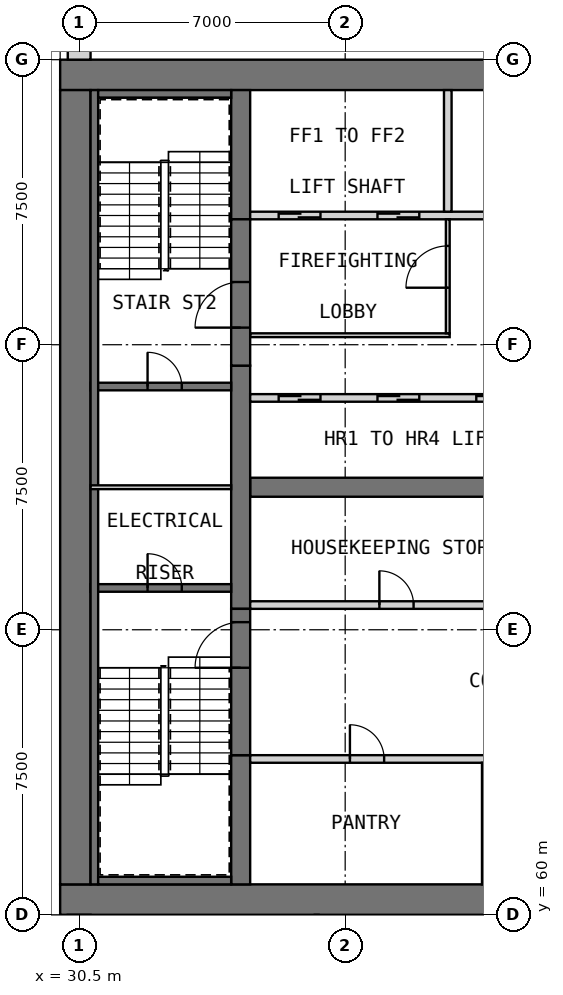
"""IFC4 building model, lengths in metres.
Left out: names, types, materials, properties, quantities, classifications, styles, units other than length and angle.
Written with IfcOpenShell. Run it as: python <this file> out.ifc"""

import sys

from ifc_helpers import new_model, si_unit, direction, frame, frame_2d, origin, place, context, subcontext, project, spatial, rectangle, extrude, element, fill, save


model = new_model("IFC4")
c1 = context("Model", 3, precision=1e-05, world=origin(), true_north=direction((0.0, 1.0)))
c2 = subcontext(c1, "Body", "Model", "MODEL_VIEW")
j1 = project(units=[si_unit("LENGTHUNIT", "METRE"), si_unit("PLANEANGLEUNIT", "RADIAN")], contexts=[c1])
p1 = place(None, origin())
s1 = spatial("IfcSite", under=j1, at=p1, CompositionType="ELEMENT")
p2 = place(p1, origin())
s2 = spatial("IfcBuilding", under=s1, at=p2, CompositionType="ELEMENT")
p3 = place(p2, frame((0.0, 0.0, 137.4)))
s3 = spatial("IfcBuildingStorey", under=s2, at=p3, CompositionType="ELEMENT", Elevation=137.4)
p4 = place(p3, frame((30.0, 60.4, 0.0), z_axis=(0.0, 0.0, 1.0), x_axis=(1.0, 0.0, 0.0)))
e1 = element("IfcWall", 1, at=p4, inside=s3, PredefinedType="SHEAR", context=c2, shape_type="SweptSolid", body=[
    extrude(rectangle(XDim=30.0, YDim=0.8, at=frame_2d((15.0, 0.0))), origin(), (0.0, 0.0, 1.0), 3.6),
])
p5 = place(p4, frame((21.9, 0.0, 0.0)))
e2 = element("IfcOpeningElement", 2, at=p5, cuts=e1, PredefinedType="OPENING", context=c2, shape_type="SweptSolid", body=[
    extrude(rectangle(XDim=1.8, YDim=2.1, at=frame_2d((0.9, 1.05))), frame((0.0, 0.41, 0.0), z_axis=(0.0, -1.0, 0.0), x_axis=(1.0, 0.0, 0.0)), (0.0, 0.0, 1.0), 0.82),
])
p6 = place(p4, frame((26.5, 0.0, 0.0)))
e3 = element("IfcOpeningElement", 3, at=p6, cuts=e1, PredefinedType="OPENING", context=c2, shape_type="SweptSolid", body=[
    extrude(rectangle(XDim=1.2, YDim=2.1, at=frame_2d((0.6, 1.05))), frame((0.0, 0.41, 0.0), z_axis=(0.0, -1.0, 0.0), x_axis=(1.0, 0.0, 0.0)), (0.0, 0.0, 1.0), 0.82),
])
p7 = place(p3, frame((30.0, 82.1, 0.0), z_axis=(0.0, 0.0, 1.0), x_axis=(1.0, 0.0, 0.0)))
e4 = element("IfcWall", 4, at=p7, inside=s3, PredefinedType="SHEAR", context=c2, shape_type="SweptSolid", body=[
    extrude(rectangle(XDim=30.0, YDim=0.8, at=frame_2d((15.0, 0.0))), origin(), (0.0, 0.0, 1.0), 3.6),
])
p8 = place(p3, frame((30.4, 60.8, 0.0), z_axis=(0.0, 0.0, 1.0), x_axis=(0.0, 1.0, 0.0)))
e5 = element("IfcWall", 5, at=p8, inside=s3, PredefinedType="SHEAR", context=c2, shape_type="SweptSolid", body=[
    extrude(rectangle(XDim=20.9, YDim=0.8, at=frame_2d((10.45, 0.0))), origin(), (0.0, 0.0, 1.0), 3.6),
])
p9 = place(p3, frame((35.0, 71.25, 0.0), z_axis=(0.0, 0.0, 1.0), x_axis=(1.0, 0.0, 0.0)))
e6 = element("IfcWall", 6, at=p9, inside=s3, PredefinedType="SHEAR", context=c2, shape_type="SweptSolid", body=[
    extrude(rectangle(XDim=15.6, YDim=0.5, at=frame_2d((7.8, 0.0))), origin(), (0.0, 0.0, 1.0), 3.6),
])
p10 = place(p3, frame((34.75, 60.8, 0.0), z_axis=(0.0, 0.0, 1.0), x_axis=(0.0, 1.0, 0.0)))
e7 = element("IfcWall", 7, at=p10, inside=s3, PredefinedType="SHEAR", context=c2, shape_type="SweptSolid", body=[
    extrude(rectangle(XDim=3.4, YDim=0.5, at=frame_2d((1.7, 0.0))), origin(), (0.0, 0.0, 1.0), 3.6),
])
p11 = place(p3, frame((34.75, 68.05, 0.0), z_axis=(0.0, 0.0, 1.0), x_axis=(0.0, 1.0, 0.0)))
e8 = element("IfcWall", 8, at=p11, inside=s3, PredefinedType="SHEAR", context=c2, shape_type="SweptSolid", body=[
    extrude(rectangle(XDim=6.4, YDim=0.5, at=frame_2d((3.2, 0.0))), origin(), (0.0, 0.0, 1.0), 3.6),
])
p12 = place(p3, frame((34.75, 78.3, 0.0), z_axis=(0.0, 0.0, 1.0), x_axis=(0.0, 1.0, 0.0)))
e9 = element("IfcWall", 9, at=p12, inside=s3, PredefinedType="SHEAR", context=c2, shape_type="SweptSolid", body=[
    extrude(rectangle(XDim=3.4, YDim=0.5, at=frame_2d((1.7, 0.0))), origin(), (0.0, 0.0, 1.0), 3.6),
])
p13 = place(p2, frame((0.0, 0.0, 34.0)))
s4 = spatial("IfcBuildingStorey", under=s2, at=p13, CompositionType="ELEMENT", Elevation=34.0)
for number, where, z_axis, x_axis in (
    (10, (29.7, 61.05, 0.0), (0.0, 0.0, 1.0), (0.0, 1.0, 0.0)),
    (11, (29.7, 65.925, 0.0), (0.0, 0.0, 1.0), (0.0, 1.0, 0.0)),
    (12, (29.7, 70.8, 0.0), (0.0, 0.0, 1.0), (0.0, 1.0, 0.0)),
    (13, (29.7, 75.675, 0.0), (0.0, 0.0, 1.0), (0.0, 1.0, 0.0)),
    (14, (29.7, 80.55, 0.0), (0.0, 0.0, 1.0), (0.0, 1.0, 0.0)),
):
    element("IfcWall", number, at=place(p13, frame(where, z_axis=z_axis, x_axis=x_axis)), inside=s4, PredefinedType="SOLIDWALL", context=c2, shape_type="SweptSolid", body=[
        extrude(rectangle(XDim=0.9, YDim=0.6, at=frame_2d((0.45, 0.0))), origin(), (0.0, 0.0, 1.0), 286.2),
    ])
p14 = place(p3, frame((30.5, 89.5, 0.0), z_axis=(0.0, 0.0, 1.0), x_axis=(0.0, -1.0, 0.0)))
e15 = element("IfcWall", 15, at=p14, inside=s3, PredefinedType="SOLIDWALL", context=c2, shape_type="SweptSolid", body=[
    extrude(rectangle(XDim=7.0, YDim=0.6, at=frame_2d((3.5, 0.0))), origin(), (0.0, 0.0, 1.0), 3.35),
])
p15 = place(p14, frame((3.925, 0.0, 0.8)))
e16 = element("IfcOpeningElement", 16, at=p15, cuts=e15, PredefinedType="OPENING", context=c2, shape_type="SweptSolid", body=[
    extrude(rectangle(XDim=2.4, YDim=1.8, at=frame_2d((1.2, 0.9))), frame((0.0, 0.31, 0.0), z_axis=(0.0, -1.0, 0.0), x_axis=(1.0, 0.0, 0.0)), (0.0, 0.0, 1.0), 0.62),
])
p16 = place(p14, frame((0.425, 0.0, 0.8)))
e17 = element("IfcOpeningElement", 17, at=p16, cuts=e15, PredefinedType="OPENING", context=c2, shape_type="SweptSolid", body=[
    extrude(rectangle(XDim=2.4, YDim=1.8, at=frame_2d((1.2, 0.9))), frame((0.0, 0.31, 0.0), z_axis=(0.0, -1.0, 0.0), x_axis=(1.0, 0.0, 0.0)), (0.0, 0.0, 1.0), 0.62),
])
p17 = place(p3, frame((35.0, 64.1, 0.0), z_axis=(0.0, 0.0, 1.0), x_axis=(1.0, 0.0, 0.0)))
e18 = element("IfcWall", 18, at=p17, inside=s3, PredefinedType="PARTITIONING", context=c2, shape_type="SweptSolid", body=[
    extrude(rectangle(XDim=15.6, YDim=0.2, at=frame_2d((7.8, 0.0))), origin(), (0.0, 0.0, 1.0), 3.35),
])
p18 = place(p17, frame((2.625, 0.0, 0.0)))
e19 = element("IfcOpeningElement", 19, at=p18, cuts=e18, PredefinedType="OPENING", context=c2, shape_type="SweptSolid", body=[
    extrude(rectangle(XDim=0.9, YDim=2.1, at=frame_2d((0.45, 1.05))), frame((0.0, 0.11, 0.0), z_axis=(0.0, -1.0, 0.0), x_axis=(1.0, 0.0, 0.0)), (0.0, 0.0, 1.0), 0.22),
])
p19 = place(p17, frame((10.425, 0.0, 0.0)))
e20 = element("IfcOpeningElement", 20, at=p19, cuts=e18, PredefinedType="OPENING", context=c2, shape_type="SweptSolid", body=[
    extrude(rectangle(XDim=0.9, YDim=2.1, at=frame_2d((0.45, 1.05))), frame((0.0, 0.11, 0.0), z_axis=(0.0, -1.0, 0.0), x_axis=(1.0, 0.0, 0.0)), (0.0, 0.0, 1.0), 0.22),
])
p20 = place(p3, frame((41.15, 60.8, 0.0), z_axis=(0.0, 0.0, 1.0), x_axis=(0.0, 1.0, 0.0)))
e21 = element("IfcWall", 21, at=p20, inside=s3, PredefinedType="PARTITIONING", context=c2, shape_type="SweptSolid", body=[
    extrude(rectangle(XDim=3.2, YDim=0.1, at=frame_2d((1.6, 0.0))), origin(), (0.0, 0.0, 1.0), 3.35),
])
p21 = place(p3, frame((35.0, 68.15, 0.0), z_axis=(0.0, 0.0, 1.0), x_axis=(1.0, 0.0, 0.0)))
e22 = element("IfcWall", 22, at=p21, inside=s3, PredefinedType="PARTITIONING", context=c2, shape_type="SweptSolid", body=[
    extrude(rectangle(XDim=15.6, YDim=0.2, at=frame_2d((7.8, 0.0))), origin(), (0.0, 0.0, 1.0), 3.35),
])
p22 = place(p21, frame((3.4, 0.0, 0.0)))
e23 = element("IfcOpeningElement", 23, at=p22, cuts=e22, PredefinedType="OPENING", context=c2, shape_type="SweptSolid", body=[
    extrude(rectangle(XDim=0.9, YDim=2.1, at=frame_2d((0.45, 1.05))), frame((0.0, 0.11, 0.0), z_axis=(0.0, -1.0, 0.0), x_axis=(1.0, 0.0, 0.0)), (0.0, 0.0, 1.0), 0.22),
])
p23 = place(p21, frame((11.2, 0.0, 0.0)))
e24 = element("IfcOpeningElement", 24, at=p23, cuts=e22, PredefinedType="OPENING", context=c2, shape_type="SweptSolid", body=[
    extrude(rectangle(XDim=0.9, YDim=2.1, at=frame_2d((0.45, 1.05))), frame((0.0, 0.11, 0.0), z_axis=(0.0, -1.0, 0.0), x_axis=(1.0, 0.0, 0.0)), (0.0, 0.0, 1.0), 0.22),
])
p24 = place(p3, frame((35.0, 73.6, 0.0), z_axis=(0.0, 0.0, 1.0), x_axis=(1.0, 0.0, 0.0)))
e25 = element("IfcWall", 25, at=p24, inside=s3, PredefinedType="SOLIDWALL", context=c2, shape_type="SweptSolid", body=[
    extrude(rectangle(XDim=15.6, YDim=0.2, at=frame_2d((7.8, 0.0))), origin(), (0.0, 0.0, 1.0), 3.6),
])
p25 = place(p24, frame((0.75, 0.0, 0.0)))
e26 = element("IfcOpeningElement", 26, at=p25, cuts=e25, PredefinedType="OPENING", context=c2, shape_type="SweptSolid", body=[
    extrude(rectangle(XDim=1.1, YDim=2.1, at=frame_2d((0.55, 1.05))), frame((0.0, 0.11, 0.0), z_axis=(0.0, -1.0, 0.0), x_axis=(1.0, 0.0, 0.0)), (0.0, 0.0, 1.0), 0.22),
])
p26 = place(p24, frame((3.35, 0.0, 0.0)))
e27 = element("IfcOpeningElement", 27, at=p26, cuts=e25, PredefinedType="OPENING", context=c2, shape_type="SweptSolid", body=[
    extrude(rectangle(XDim=1.1, YDim=2.1, at=frame_2d((0.55, 1.05))), frame((0.0, 0.11, 0.0), z_axis=(0.0, -1.0, 0.0), x_axis=(1.0, 0.0, 0.0)), (0.0, 0.0, 1.0), 0.22),
])
p27 = place(p24, frame((5.95, 0.0, 0.0)))
e28 = element("IfcOpeningElement", 28, at=p27, cuts=e25, PredefinedType="OPENING", context=c2, shape_type="SweptSolid", body=[
    extrude(rectangle(XDim=1.1, YDim=2.1, at=frame_2d((0.55, 1.05))), frame((0.0, 0.11, 0.0), z_axis=(0.0, -1.0, 0.0), x_axis=(1.0, 0.0, 0.0)), (0.0, 0.0, 1.0), 0.22),
])
p28 = place(p24, frame((8.55, 0.0, 0.0)))
e29 = element("IfcOpeningElement", 29, at=p28, cuts=e25, PredefinedType="OPENING", context=c2, shape_type="SweptSolid", body=[
    extrude(rectangle(XDim=1.1, YDim=2.1, at=frame_2d((0.55, 1.05))), frame((0.0, 0.11, 0.0), z_axis=(0.0, -1.0, 0.0), x_axis=(1.0, 0.0, 0.0)), (0.0, 0.0, 1.0), 0.22),
])
p29 = place(p24, frame((11.15, 0.0, 0.0)))
e30 = element("IfcOpeningElement", 30, at=p29, cuts=e25, PredefinedType="OPENING", context=c2, shape_type="SweptSolid", body=[
    extrude(rectangle(XDim=1.1, YDim=2.1, at=frame_2d((0.55, 1.05))), frame((0.0, 0.11, 0.0), z_axis=(0.0, -1.0, 0.0), x_axis=(1.0, 0.0, 0.0)), (0.0, 0.0, 1.0), 0.22),
])
p30 = place(p24, frame((13.75, 0.0, 0.0)))
e31 = element("IfcOpeningElement", 31, at=p30, cuts=e25, PredefinedType="OPENING", context=c2, shape_type="SweptSolid", body=[
    extrude(rectangle(XDim=1.1, YDim=2.1, at=frame_2d((0.55, 1.05))), frame((0.0, 0.11, 0.0), z_axis=(0.0, -1.0, 0.0), x_axis=(1.0, 0.0, 0.0)), (0.0, 0.0, 1.0), 0.22),
])
p31 = place(p3, frame((35.0, 78.4, 0.0), z_axis=(0.0, 0.0, 1.0), x_axis=(1.0, 0.0, 0.0)))
e32 = element("IfcWall", 32, at=p31, inside=s3, PredefinedType="SOLIDWALL", context=c2, shape_type="SweptSolid", body=[
    extrude(rectangle(XDim=15.6, YDim=0.2, at=frame_2d((7.8, 0.0))), origin(), (0.0, 0.0, 1.0), 3.6),
])
p32 = place(p31, frame((0.75, 0.0, 0.0)))
e33 = element("IfcOpeningElement", 33, at=p32, cuts=e32, PredefinedType="OPENING", context=c2, shape_type="SweptSolid", body=[
    extrude(rectangle(XDim=1.1, YDim=2.1, at=frame_2d((0.55, 1.05))), frame((0.0, 0.11, 0.0), z_axis=(0.0, -1.0, 0.0), x_axis=(1.0, 0.0, 0.0)), (0.0, 0.0, 1.0), 0.22),
])
p33 = place(p31, frame((3.35, 0.0, 0.0)))
e34 = element("IfcOpeningElement", 34, at=p33, cuts=e32, PredefinedType="OPENING", context=c2, shape_type="SweptSolid", body=[
    extrude(rectangle(XDim=1.1, YDim=2.1, at=frame_2d((0.55, 1.05))), frame((0.0, 0.11, 0.0), z_axis=(0.0, -1.0, 0.0), x_axis=(1.0, 0.0, 0.0)), (0.0, 0.0, 1.0), 0.22),
])
p34 = place(p31, frame((11.15, 0.0, 0.0)))
e35 = element("IfcOpeningElement", 35, at=p34, cuts=e32, PredefinedType="OPENING", context=c2, shape_type="SweptSolid", body=[
    extrude(rectangle(XDim=1.1, YDim=2.1, at=frame_2d((0.55, 1.05))), frame((0.0, 0.11, 0.0), z_axis=(0.0, -1.0, 0.0), x_axis=(1.0, 0.0, 0.0)), (0.0, 0.0, 1.0), 0.22),
])
p35 = place(p31, frame((13.75, 0.0, 0.0)))
e36 = element("IfcOpeningElement", 36, at=p35, cuts=e32, PredefinedType="OPENING", context=c2, shape_type="SweptSolid", body=[
    extrude(rectangle(XDim=1.1, YDim=2.1, at=frame_2d((0.55, 1.05))), frame((0.0, 0.11, 0.0), z_axis=(0.0, -1.0, 0.0), x_axis=(1.0, 0.0, 0.0)), (0.0, 0.0, 1.0), 0.22),
])
p36 = place(p3, frame((40.2, 78.5, 0.0), z_axis=(0.0, 0.0, 1.0), x_axis=(0.0, 1.0, 0.0)))
e37 = element("IfcWall", 37, at=p36, inside=s3, PredefinedType="SOLIDWALL", context=c2, shape_type="SweptSolid", body=[
    extrude(rectangle(XDim=3.2, YDim=0.2, at=frame_2d((1.6, 0.0))), origin(), (0.0, 0.0, 1.0), 3.6),
])
p37 = place(p3, frame((35.0, 75.25, 0.0), z_axis=(0.0, 0.0, 1.0), x_axis=(1.0, 0.0, 0.0)))
e38 = element("IfcWall", 38, at=p37, inside=s3, PredefinedType="PARTITIONING", context=c2, shape_type="SweptSolid", body=[
    extrude(rectangle(XDim=5.25, YDim=0.1, at=frame_2d((2.625, 0.0))), origin(), (0.0, 0.0, 1.0), 3.35),
])
p38 = place(p3, frame((40.2, 75.3, 0.0), z_axis=(0.0, 0.0, 1.0), x_axis=(0.0, 1.0, 0.0)))
e39 = element("IfcWall", 39, at=p38, inside=s3, PredefinedType="PARTITIONING", context=c2, shape_type="SweptSolid", body=[
    extrude(rectangle(XDim=3.0, YDim=0.1, at=frame_2d((1.5, 0.0))), origin(), (0.0, 0.0, 1.0), 3.35),
])
p39 = place(p38, frame((1.2, 0.0, 0.0)))
e40 = element("IfcOpeningElement", 40, at=p39, cuts=e39, PredefinedType="OPENING", context=c2, shape_type="SweptSolid", body=[
    extrude(rectangle(XDim=1.1, YDim=2.1, at=frame_2d((0.55, 1.05))), frame((0.0, 0.06, 0.0), z_axis=(0.0, -1.0, 0.0), x_axis=(1.0, 0.0, 0.0)), (0.0, 0.0, 1.0), 0.12),
])
p40 = place(p3, frame((34.75, 64.2, 0.0), z_axis=(0.0, 0.0, 1.0), x_axis=(0.0, 1.0, 0.0)))
e41 = element("IfcWall", 41, at=p40, inside=s3, PredefinedType="SOLIDWALL", context=c2, shape_type="SweptSolid", body=[
    extrude(rectangle(XDim=3.85, YDim=0.5, at=frame_2d((1.925, 0.0))), origin(), (0.0, 0.0, 1.0), 2.4),
])
p41 = place(p40, frame((2.3, 0.0, 0.0)))
e42 = element("IfcOpeningElement", 42, at=p41, cuts=e41, PredefinedType="OPENING", context=c2, shape_type="SweptSolid", body=[
    extrude(rectangle(XDim=1.2, YDim=2.1, at=frame_2d((0.6, 1.05))), frame((0.0, 0.26, 0.0), z_axis=(0.0, -1.0, 0.0), x_axis=(1.0, 0.0, 0.0)), (0.0, 0.0, 1.0), 0.52),
])
p42 = place(p3, frame((34.75, 74.45, 0.0), z_axis=(0.0, 0.0, 1.0), x_axis=(0.0, 1.0, 0.0)))
e43 = element("IfcWall", 43, at=p42, inside=s3, PredefinedType="SOLIDWALL", context=c2, shape_type="SweptSolid", body=[
    extrude(rectangle(XDim=3.85, YDim=0.5, at=frame_2d((1.925, 0.0))), origin(), (0.0, 0.0, 1.0), 2.4),
])
p43 = place(p42, frame((1.0, 0.0, 0.0)))
e44 = element("IfcOpeningElement", 44, at=p43, cuts=e43, PredefinedType="OPENING", context=c2, shape_type="SweptSolid", body=[
    extrude(rectangle(XDim=1.2, YDim=2.1, at=frame_2d((0.6, 1.05))), frame((0.0, 0.26, 0.0), z_axis=(0.0, -1.0, 0.0), x_axis=(1.0, 0.0, 0.0)), (0.0, 0.0, 1.0), 0.52),
])
p44 = place(p3, frame((30.8, 68.6, 0.0), z_axis=(0.0, 0.0, 1.0), x_axis=(1.0, 0.0, 0.0)))
e45 = element("IfcWall", 45, at=p44, inside=s3, PredefinedType="SOLIDWALL", context=c2, shape_type="SweptSolid", body=[
    extrude(rectangle(XDim=3.7, YDim=0.2, at=frame_2d((1.85, 0.0))), origin(), (0.0, 0.0, 1.0), 3.35),
])
p45 = place(p44, frame((1.5, 0.0, 0.0)))
e46 = element("IfcOpeningElement", 46, at=p45, cuts=e45, PredefinedType="OPENING", context=c2, shape_type="SweptSolid", body=[
    extrude(rectangle(XDim=0.9, YDim=2.1, at=frame_2d((0.45, 1.05))), frame((0.0, 0.11, 0.0), z_axis=(0.0, -1.0, 0.0), x_axis=(1.0, 0.0, 0.0)), (0.0, 0.0, 1.0), 0.22),
])
p46 = place(p3, frame((30.8, 73.9, 0.0), z_axis=(0.0, 0.0, 1.0), x_axis=(1.0, 0.0, 0.0)))
e47 = element("IfcWall", 47, at=p46, inside=s3, PredefinedType="SOLIDWALL", context=c2, shape_type="SweptSolid", body=[
    extrude(rectangle(XDim=3.7, YDim=0.2, at=frame_2d((1.85, 0.0))), origin(), (0.0, 0.0, 1.0), 3.35),
])
p47 = place(p46, frame((1.5, 0.0, 0.0)))
e48 = element("IfcOpeningElement", 48, at=p47, cuts=e47, PredefinedType="OPENING", context=c2, shape_type="SweptSolid", body=[
    extrude(rectangle(XDim=0.9, YDim=2.1, at=frame_2d((0.45, 1.05))), frame((0.0, 0.11, 0.0), z_axis=(0.0, -1.0, 0.0), x_axis=(1.0, 0.0, 0.0)), (0.0, 0.0, 1.0), 0.22),
])
p48 = place(p3, frame((30.9, 60.8, 0.0), z_axis=(0.0, 0.0, 1.0), x_axis=(0.0, 1.0, 0.0)))
e49 = element("IfcWall", 49, at=p48, inside=s3, PredefinedType="SOLIDWALL", context=c2, shape_type="SweptSolid", body=[
    extrude(rectangle(XDim=20.9, YDim=0.2, at=frame_2d((10.45, 0.0))), origin(), (0.0, 0.0, 1.0), 3.35),
])
for number, where, z_axis, x_axis in (
    (50, (31.0, 60.9, 0.0), (0.0, 0.0, 1.0), (1.0, 0.0, 0.0)),
    (51, (31.0, 81.6, 0.0), (0.0, 0.0, 1.0), (1.0, 0.0, 0.0)),
):
    element("IfcWall", number, at=place(p3, frame(where, z_axis=z_axis, x_axis=x_axis)), inside=s3, PredefinedType="SOLIDWALL", context=c2, shape_type="SweptSolid", body=[
        extrude(rectangle(XDim=3.5, YDim=0.2, at=frame_2d((1.75, 0.0))), origin(), (0.0, 0.0, 1.0), 3.35),
    ])
p49 = place(p3, frame((30.8, 71.25, 0.0), z_axis=(0.0, 0.0, 1.0), x_axis=(1.0, 0.0, 0.0)))
e52 = element("IfcWall", 52, at=p49, inside=s3, PredefinedType="PARTITIONING", context=c2, shape_type="SweptSolid", body=[
    extrude(rectangle(XDim=3.7, YDim=0.1, at=frame_2d((1.85, 0.0))), origin(), (0.0, 0.0, 1.0), 3.35),
])
p50 = place(p18, origin())
e53 = element("IfcDoor", 53, at=p50, inside=s3, OperationType="SINGLE_SWING_LEFT", PredefinedType="DOOR", context=c2, shape_type="SweptSolid", body=[
    extrude(rectangle(XDim=0.9, YDim=2.1, at=frame_2d((0.45, 1.05))), frame((0.0, 0.025, 0.0), z_axis=(0.0, -1.0, 0.0), x_axis=(1.0, 0.0, 0.0)), (0.0, 0.0, 1.0), 0.05),
])
fill(e19, e53)
p51 = place(p22, origin())
e54 = element("IfcDoor", 54, at=p51, inside=s3, OperationType="SINGLE_SWING_LEFT", PredefinedType="DOOR", context=c2, shape_type="SweptSolid", body=[
    extrude(rectangle(XDim=0.9, YDim=2.1, at=frame_2d((0.45, 1.05))), frame((0.0, 0.025, 0.0), z_axis=(0.0, -1.0, 0.0), x_axis=(1.0, 0.0, 0.0)), (0.0, 0.0, 1.0), 0.05),
])
fill(e23, e54)
p52 = place(p25, origin())
e55 = element("IfcDoor", 55, at=p52, inside=s3, OperationType="DOUBLE_DOOR_SLIDING", PredefinedType="DOOR", context=c2, shape_type="SweptSolid", body=[
    extrude(rectangle(XDim=1.1, YDim=2.1, at=frame_2d((0.55, 1.05))), frame((0.0, 0.025, 0.0), z_axis=(0.0, -1.0, 0.0), x_axis=(1.0, 0.0, 0.0)), (0.0, 0.0, 1.0), 0.05),
])
fill(e26, e55)
p53 = place(p26, origin())
e56 = element("IfcDoor", 56, at=p53, inside=s3, OperationType="DOUBLE_DOOR_SLIDING", PredefinedType="DOOR", context=c2, shape_type="SweptSolid", body=[
    extrude(rectangle(XDim=1.1, YDim=2.1, at=frame_2d((0.55, 1.05))), frame((0.0, 0.025, 0.0), z_axis=(0.0, -1.0, 0.0), x_axis=(1.0, 0.0, 0.0)), (0.0, 0.0, 1.0), 0.05),
])
fill(e27, e56)
p54 = place(p27, origin())
e57 = element("IfcDoor", 57, at=p54, inside=s3, OperationType="DOUBLE_DOOR_SLIDING", PredefinedType="DOOR", context=c2, shape_type="SweptSolid", body=[
    extrude(rectangle(XDim=1.1, YDim=2.1, at=frame_2d((0.55, 1.05))), frame((0.0, 0.025, 0.0), z_axis=(0.0, -1.0, 0.0), x_axis=(1.0, 0.0, 0.0)), (0.0, 0.0, 1.0), 0.05),
])
fill(e28, e57)
p55 = place(p32, origin())
e58 = element("IfcDoor", 58, at=p55, inside=s3, OperationType="DOUBLE_DOOR_SLIDING", PredefinedType="DOOR", context=c2, shape_type="SweptSolid", body=[
    extrude(rectangle(XDim=1.1, YDim=2.1, at=frame_2d((0.55, 1.05))), frame((0.0, 0.025, 0.0), z_axis=(0.0, -1.0, 0.0), x_axis=(1.0, 0.0, 0.0)), (0.0, 0.0, 1.0), 0.05),
])
fill(e33, e58)
p56 = place(p33, origin())
e59 = element("IfcDoor", 59, at=p56, inside=s3, OperationType="DOUBLE_DOOR_SLIDING", PredefinedType="DOOR", context=c2, shape_type="SweptSolid", body=[
    extrude(rectangle(XDim=1.1, YDim=2.1, at=frame_2d((0.55, 1.05))), frame((0.0, 0.025, 0.0), z_axis=(0.0, -1.0, 0.0), x_axis=(1.0, 0.0, 0.0)), (0.0, 0.0, 1.0), 0.05),
])
fill(e34, e59)
p57 = place(p39, origin())
e60 = element("IfcDoor", 60, at=p57, inside=s3, OperationType="SINGLE_SWING_LEFT", PredefinedType="DOOR", context=c2, shape_type="SweptSolid", body=[
    extrude(rectangle(XDim=1.1, YDim=2.1, at=frame_2d((0.55, 1.05))), frame((0.0, 0.025, 0.0), z_axis=(0.0, -1.0, 0.0), x_axis=(1.0, 0.0, 0.0)), (0.0, 0.0, 1.0), 0.05),
])
fill(e40, e60)
p58 = place(p41, origin())
e61 = element("IfcDoor", 61, at=p58, inside=s3, OperationType="SINGLE_SWING_LEFT", PredefinedType="DOOR", context=c2, shape_type="SweptSolid", body=[
    extrude(rectangle(XDim=1.2, YDim=2.1, at=frame_2d((0.6, 1.05))), frame((0.0, 0.025, 0.0), z_axis=(0.0, -1.0, 0.0), x_axis=(1.0, 0.0, 0.0)), (0.0, 0.0, 1.0), 0.05),
])
fill(e42, e61)
p59 = place(p43, origin())
e62 = element("IfcDoor", 62, at=p59, inside=s3, OperationType="SINGLE_SWING_RIGHT", PredefinedType="DOOR", context=c2, shape_type="SweptSolid", body=[
    extrude(rectangle(XDim=1.2, YDim=2.1, at=frame_2d((0.6, 1.05))), frame((0.0, 0.025, 0.0), z_axis=(0.0, -1.0, 0.0), x_axis=(1.0, 0.0, 0.0)), (0.0, 0.0, 1.0), 0.05),
])
fill(e44, e62)
p60 = place(p45, origin())
e63 = element("IfcDoor", 63, at=p60, inside=s3, OperationType="SINGLE_SWING_LEFT", PredefinedType="DOOR", context=c2, shape_type="SweptSolid", body=[
    extrude(rectangle(XDim=0.9, YDim=2.1, at=frame_2d((0.45, 1.05))), frame((0.0, 0.025, 0.0), z_axis=(0.0, -1.0, 0.0), x_axis=(1.0, 0.0, 0.0)), (0.0, 0.0, 1.0), 0.05),
])
fill(e46, e63)
p61 = place(p47, origin())
e64 = element("IfcDoor", 64, at=p61, inside=s3, OperationType="SINGLE_SWING_RIGHT", PredefinedType="DOOR", context=c2, shape_type="SweptSolid", body=[
    extrude(rectangle(XDim=0.9, YDim=2.1, at=frame_2d((0.45, 1.05))), frame((0.0, 0.025, 0.0), z_axis=(0.0, -1.0, 0.0), x_axis=(1.0, 0.0, 0.0)), (0.0, 0.0, 1.0), 0.05),
])
fill(e48, e64)
save(model, sys.argv[1])
